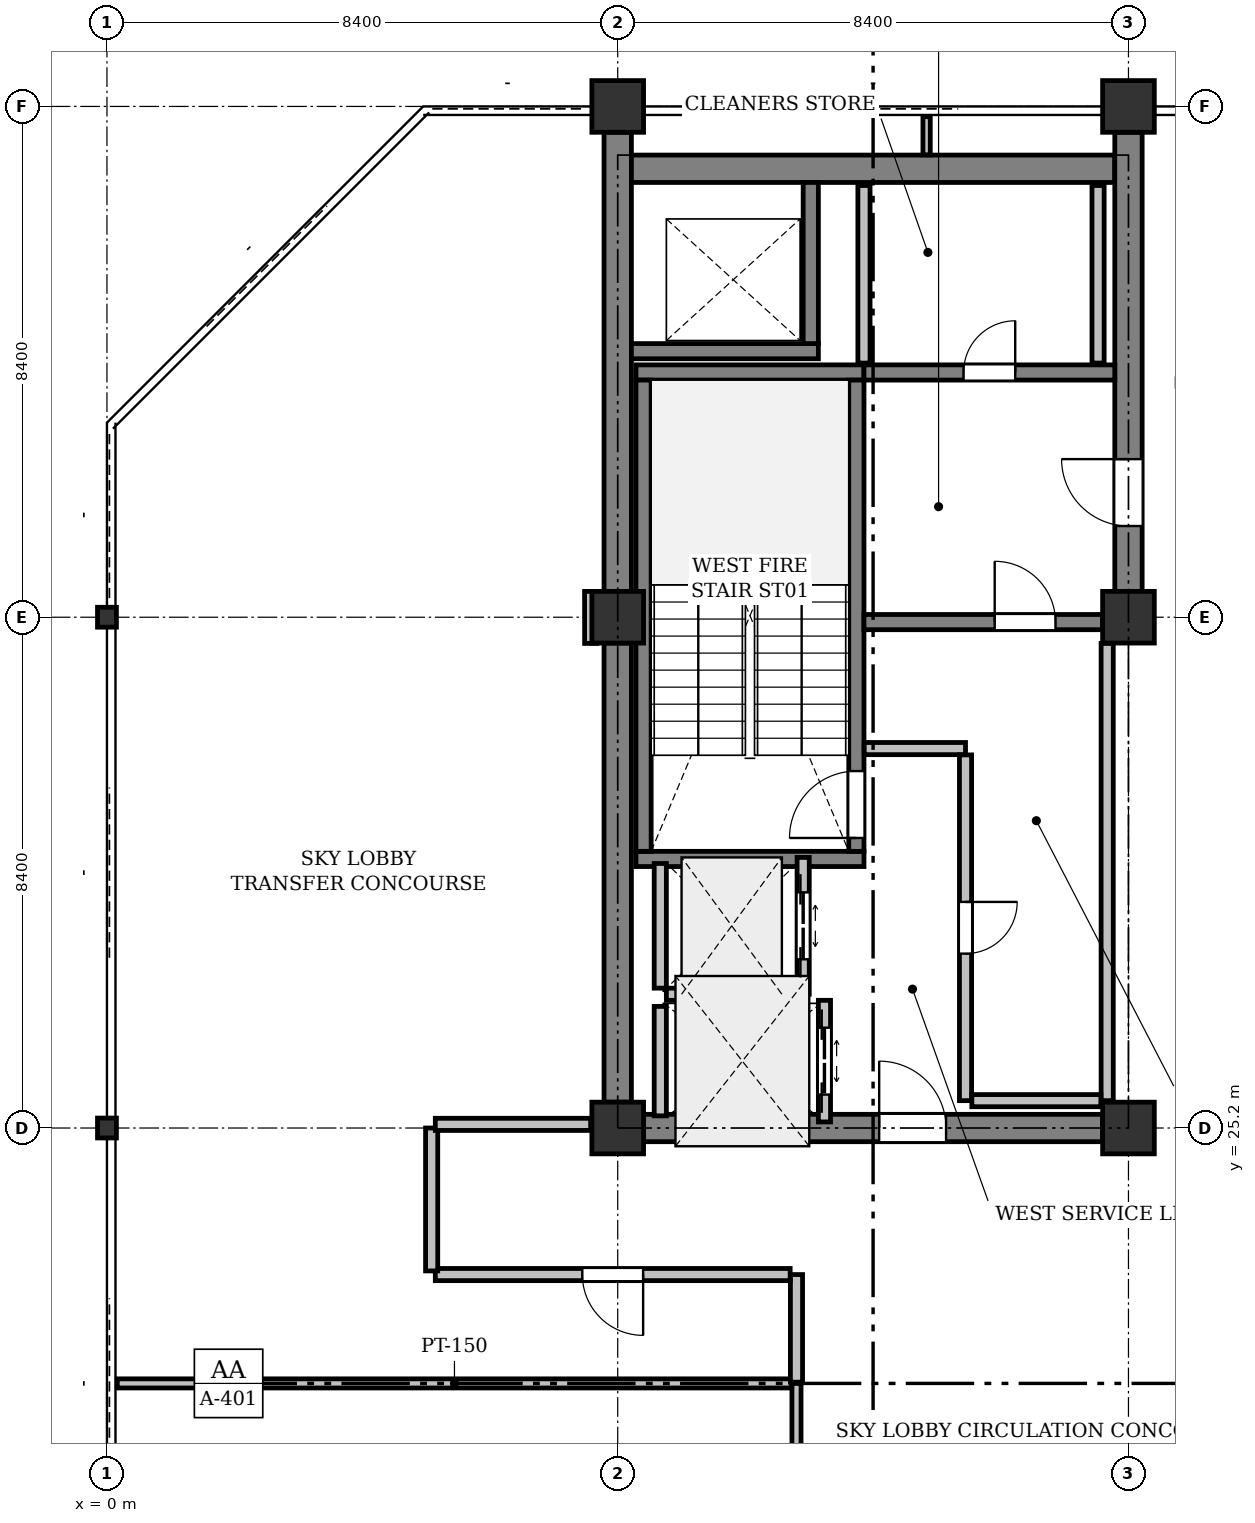
"""IFC4 building model, lengths in metres.
Left out: names, types, materials, properties, quantities, classifications, styles, units other than length and angle.
Written with IfcOpenShell. Run it as: python <this file> out.ifc"""

import sys

from ifc_helpers import new_model, si_unit, direction, frame, frame_2d, origin, origin_2d, place, context, subcontext, project, spatial, rectangle, i_section, extrude, element, fill, save


model = new_model("IFC4")
c1 = context("Model", 3, precision=1e-05, world=origin(), true_north=direction((0.0, 1.0)))
c2 = subcontext(c1, "Body", "Model", "MODEL_VIEW")
j1 = project(units=[si_unit("LENGTHUNIT", "METRE"), si_unit("PLANEANGLEUNIT", "RADIAN")], contexts=[c1])
p1 = place(None, origin())
s1 = spatial("IfcSite", under=j1, at=p1, CompositionType="ELEMENT")
p2 = place(p1, origin())
s2 = spatial("IfcBuilding", under=s1, at=p2, CompositionType="ELEMENT")
p3 = place(p2, frame((0.0, 0.0, 286.2)))
s3 = spatial("IfcBuildingStorey", under=s2, at=p3, CompositionType="ELEMENT", Elevation=286.2)
for number, where, z_axis, x_axis in (
    (1, (0.0, 25.2, 0.0), (0.0, 0.0, 1.0), (1.0, 0.0, 0.0)),
    (2, (0.0, 33.6, 0.0), (0.0, 0.0, 1.0), (1.0, 0.0, 0.0)),
):
    element("IfcColumn", number, at=place(p3, frame(where, z_axis=z_axis, x_axis=x_axis)), inside=s3, PredefinedType="COLUMN", context=c2, shape_type="SweptSolid", body=[
        extrude(i_section(OverallWidth=0.311, OverallDepth=0.327, WebThickness=0.016, FlangeThickness=0.025, FilletRadius=0.017, at=origin_2d()), origin(), (0.0, 0.0, 1.0), 4.0),
    ])
for number, where, z_axis, x_axis in (
    (3, (8.4, 25.2, 0.0), (0.0, 0.0, 1.0), (1.0, 0.0, 0.0)),
    (4, (8.4, 33.6, 0.0), (0.0, 0.0, 1.0), (1.0, 0.0, 0.0)),
    (5, (8.4, 42.0, 0.0), (0.0, 0.0, 1.0), (1.0, 0.0, 0.0)),
    (6, (16.8, 25.2, 0.0), (0.0, 0.0, 1.0), (1.0, 0.0, 0.0)),
    (7, (16.8, 33.6, 0.0), (0.0, 0.0, 1.0), (1.0, 0.0, 0.0)),
    (8, (16.8, 42.0, 0.0), (0.0, 0.0, 1.0), (1.0, 0.0, 0.0)),
):
    element("IfcColumn", number, at=place(p3, frame(where, z_axis=z_axis, x_axis=x_axis)), inside=s3, PredefinedType="COLUMN", context=c2, shape_type="SweptSolid", body=[
        extrude(rectangle(XDim=0.85, YDim=0.85, at=origin_2d()), origin(), (0.0, 0.0, 1.0), 4.0),
    ])
for number, where, z_axis, x_axis in (
    (9, (8.4, 25.625, 0.0), (0.0, 0.0, 1.0), (0.0, 1.0, 0.0)),
    (10, (8.4, 34.025, 0.0), (0.0, 0.0, 1.0), (0.0, 1.0, 0.0)),
):
    element("IfcWall", number, at=place(p3, frame(where, z_axis=z_axis, x_axis=x_axis)), inside=s3, PredefinedType="SHEAR", context=c2, shape_type="SweptSolid", body=[
        extrude(rectangle(XDim=7.55, YDim=0.45, at=frame_2d((3.775, 0.0))), origin(), (0.0, 0.0, 1.0), 3.725),
    ])
p4 = place(p3, frame((8.625, 40.975, 0.0), z_axis=(0.0, 0.0, 1.0), x_axis=(1.0, 0.0, 0.0)))
e11 = element("IfcWall", 11, at=p4, inside=s3, PredefinedType="SHEAR", context=c2, shape_type="SweptSolid", body=[
    extrude(rectangle(XDim=7.95, YDim=0.45, at=frame_2d((3.975, 0.0))), origin(), (0.0, 0.0, 1.0), 3.725),
])
p5 = place(p3, frame((16.8, 34.025, 0.0), z_axis=(0.0, 0.0, 1.0), x_axis=(0.0, 1.0, 0.0)))
e12 = element("IfcWall", 12, at=p5, inside=s3, PredefinedType="SHEAR", context=c2, shape_type="SweptSolid", body=[
    extrude(rectangle(XDim=7.55, YDim=0.45, at=frame_2d((3.775, 0.0))), origin(), (0.0, 0.0, 1.0), 3.725),
])
p6 = place(p5, frame((1.075, 0.0, 0.0)))
e13 = element("IfcOpeningElement", 13, at=p6, cuts=e12, PredefinedType="OPENING", context=c2, shape_type="SweptSolid", body=[
    extrude(rectangle(XDim=1.1, YDim=2.15, at=frame_2d((0.55, 1.075))), frame((0.0, 0.235, 0.0), z_axis=(0.0, -1.0, 0.0), x_axis=(1.0, 0.0, 0.0)), (0.0, 0.0, 1.0), 0.47),
])
p7 = place(p3, frame((8.825, 25.2, 0.0), z_axis=(0.0, 0.0, 1.0), x_axis=(1.0, 0.0, 0.0)))
e14 = element("IfcWall", 14, at=p7, inside=s3, PredefinedType="SHEAR", context=c2, shape_type="SweptSolid", body=[
    extrude(rectangle(XDim=7.55, YDim=0.45, at=frame_2d((3.775, 0.0))), origin(), (0.0, 0.0, 1.0), 3.725),
])
p8 = place(p7, frame((3.875, 0.0, 0.0)))
e15 = element("IfcOpeningElement", 15, at=p8, cuts=e14, PredefinedType="OPENING", context=c2, shape_type="SweptSolid", body=[
    extrude(rectangle(XDim=1.1, YDim=2.15, at=frame_2d((0.55, 1.075))), frame((0.0, 0.235, 0.0), z_axis=(0.0, -1.0, 0.0), x_axis=(1.0, 0.0, 0.0)), (0.0, 0.0, 1.0), 0.47),
])
for number, where, z_axis, x_axis in (
    (16, (12.45, 29.625, 0.0), (0.0, 0.0, 1.0), (-1.0, 0.0, 0.0)),
    (17, (12.45, 37.625, 0.0), (0.0, 0.0, 1.0), (-1.0, 0.0, 0.0)),
):
    element("IfcWall", number, at=place(p3, frame(where, z_axis=z_axis, x_axis=x_axis)), inside=s3, PredefinedType="SHEAR", context=c2, shape_type="SweptSolid", body=[
        extrude(rectangle(XDim=3.75, YDim=0.25, at=frame_2d((1.875, 0.0))), origin(), (0.0, 0.0, 1.0), 3.725),
    ])
p9 = place(p3, frame((12.325, 29.75, 0.0), z_axis=(0.0, 0.0, 1.0), x_axis=(0.0, 1.0, 0.0)))
e18 = element("IfcWall", 18, at=p9, inside=s3, PredefinedType="SHEAR", context=c2, shape_type="SweptSolid", body=[
    extrude(rectangle(XDim=7.75, YDim=0.25, at=frame_2d((3.875, 0.0))), origin(), (0.0, 0.0, 1.0), 3.725),
])
p10 = place(p9, frame((0.22, 0.0, 0.0)))
e19 = element("IfcOpeningElement", 19, at=p10, cuts=e18, PredefinedType="OPENING", context=c2, shape_type="SweptSolid", body=[
    extrude(rectangle(XDim=1.1, YDim=2.15, at=frame_2d((0.55, 1.075))), frame((0.0, 0.135, 0.0), z_axis=(0.0, -1.0, 0.0), x_axis=(1.0, 0.0, 0.0)), (0.0, 0.0, 1.0), 0.27),
])
p11 = place(p3, frame((8.825, 29.75, 0.0), z_axis=(0.0, 0.0, 1.0), x_axis=(0.0, 1.0, 0.0)))
e20 = element("IfcWall", 20, at=p11, inside=s3, PredefinedType="SHEAR", context=c2, shape_type="SweptSolid", body=[
    extrude(rectangle(XDim=7.75, YDim=0.25, at=frame_2d((3.875, 0.0))), origin(), (0.0, 0.0, 1.0), 3.725),
])
p12 = place(p3, frame((8.625, 37.975, 0.0), z_axis=(0.0, 0.0, 1.0), x_axis=(1.0, 0.0, 0.0)))
e21 = element("IfcWall", 21, at=p12, inside=s3, PredefinedType="SHEAR", context=c2, shape_type="SweptSolid", body=[
    extrude(rectangle(XDim=3.075, YDim=0.25, at=frame_2d((1.538, 0.0))), origin(), (0.0, 0.0, 1.0), 3.725),
])
p13 = place(p3, frame((11.575, 38.1, 0.0), z_axis=(0.0, 0.0, 1.0), x_axis=(0.0, 1.0, 0.0)))
e22 = element("IfcWall", 22, at=p13, inside=s3, PredefinedType="SHEAR", context=c2, shape_type="SweptSolid", body=[
    extrude(rectangle(XDim=2.65, YDim=0.25, at=frame_2d((1.325, 0.0))), origin(), (0.0, 0.0, 1.0), 3.725),
])
p14 = place(p3, frame((12.45, 33.52, 0.0), z_axis=(0.0, 0.0, 1.0), x_axis=(1.0, 0.0, 0.0)))
e23 = element("IfcWall", 23, at=p14, inside=s3, PredefinedType="SHEAR", context=c2, shape_type="SweptSolid", body=[
    extrude(rectangle(XDim=3.925, YDim=0.25, at=frame_2d((1.962, 0.0))), origin(), (0.0, 0.0, 1.0), 3.725),
])
p15 = place(p14, frame((2.15, 0.0, 0.0)))
e24 = element("IfcOpeningElement", 24, at=p15, cuts=e23, PredefinedType="OPENING", context=c2, shape_type="SweptSolid", body=[
    extrude(rectangle(XDim=1.0, YDim=2.15, at=frame_2d((0.5, 1.075))), frame((0.0, 0.135, 0.0), z_axis=(0.0, -1.0, 0.0), x_axis=(1.0, 0.0, 0.0)), (0.0, 0.0, 1.0), 0.27),
])
p16 = place(p3, frame((12.45, 37.625, 0.0), z_axis=(0.0, 0.0, 1.0), x_axis=(1.0, 0.0, 0.0)))
e25 = element("IfcWall", 25, at=p16, inside=s3, PredefinedType="SHEAR", context=c2, shape_type="SweptSolid", body=[
    extrude(rectangle(XDim=4.125, YDim=0.25, at=frame_2d((2.062, 0.0))), origin(), (0.0, 0.0, 1.0), 3.725),
])
p17 = place(p16, frame((1.637, 0.0, 0.0)))
e26 = element("IfcOpeningElement", 26, at=p17, cuts=e25, PredefinedType="OPENING", context=c2, shape_type="SweptSolid", body=[
    extrude(rectangle(XDim=0.85, YDim=2.15, at=frame_2d((0.425, 1.075))), frame((0.0, 0.135, 0.0), z_axis=(0.0, -1.0, 0.0), x_axis=(1.0, 0.0, 0.0)), (0.0, 0.0, 1.0), 0.27),
])
p18 = place(p3, frame((11.45, 27.4, 0.0), z_axis=(0.0, 0.0, 1.0), x_axis=(0.0, 1.0, 0.0)))
e27 = element("IfcWall", 27, at=p18, inside=s3, PredefinedType="PARTITIONING", context=c2, shape_type="SweptSolid", body=[
    extrude(rectangle(XDim=2.25, YDim=0.2, at=frame_2d((1.125, 0.0))), origin(), (0.0, 0.0, 1.0), 3.725),
])
p19 = place(p18, frame((0.575, 0.0, 0.0)))
e28 = element("IfcOpeningElement", 28, at=p19, cuts=e27, PredefinedType="OPENING", context=c2, shape_type="SweptSolid", body=[
    extrude(rectangle(XDim=1.1, YDim=2.2, at=frame_2d((0.55, 1.1))), frame((0.0, 0.11, 0.0), z_axis=(0.0, -1.0, 0.0), x_axis=(1.0, 0.0, 0.0)), (0.0, 0.0, 1.0), 0.22),
])
p20 = place(p3, frame((9.1, 27.5, 0.0), z_axis=(0.0, 0.0, 1.0), x_axis=(0.0, 1.0, 0.0)))
e29 = element("IfcWall", 29, at=p20, inside=s3, PredefinedType="PARTITIONING", context=c2, shape_type="SweptSolid", body=[
    extrude(rectangle(XDim=2.05, YDim=0.2, at=frame_2d((1.025, 0.0))), origin(), (0.0, 0.0, 1.0), 3.725),
])
p21 = place(p3, frame((9.2, 27.4, 0.0), z_axis=(0.0, 0.0, 1.0), x_axis=(1.0, 0.0, 0.0)))
e30 = element("IfcWall", 30, at=p21, inside=s3, PredefinedType="PARTITIONING", context=c2, shape_type="SweptSolid", body=[
    extrude(rectangle(XDim=2.15, YDim=0.2, at=frame_2d((1.075, 0.0))), origin(), (0.0, 0.0, 1.0), 3.725),
])
p22 = place(p3, frame((11.8, 25.3, 0.0), z_axis=(0.0, 0.0, 1.0), x_axis=(0.0, 1.0, 0.0)))
e31 = element("IfcWall", 31, at=p22, inside=s3, PredefinedType="PARTITIONING", context=c2, shape_type="SweptSolid", body=[
    extrude(rectangle(XDim=2.0, YDim=0.2, at=frame_2d((1.0, 0.0))), origin(), (0.0, 0.0, 1.0), 3.725),
])
p23 = place(p22, frame((0.45, 0.0, 0.0)))
e32 = element("IfcOpeningElement", 32, at=p23, cuts=e31, PredefinedType="OPENING", context=c2, shape_type="SweptSolid", body=[
    extrude(rectangle(XDim=1.1, YDim=2.2, at=frame_2d((0.55, 1.1))), frame((0.0, 0.11, 0.0), z_axis=(0.0, -1.0, 0.0), x_axis=(1.0, 0.0, 0.0)), (0.0, 0.0, 1.0), 0.22),
])
p24 = place(p3, frame((9.1, 25.4, 0.0), z_axis=(0.0, 0.0, 1.0), x_axis=(0.0, 1.0, 0.0)))
e33 = element("IfcWall", 33, at=p24, inside=s3, PredefinedType="PARTITIONING", context=c2, shape_type="SweptSolid", body=[
    extrude(rectangle(XDim=1.8, YDim=0.2, at=frame_2d((0.9, 0.0))), origin(), (0.0, 0.0, 1.0), 3.725),
])
p25 = place(p3, frame((16.45, 25.65, 0.0), z_axis=(0.0, 0.0, 1.0), x_axis=(0.0, 1.0, 0.0)))
e34 = element("IfcWall", 34, at=p25, inside=s3, PredefinedType="PARTITIONING", context=c2, shape_type="SweptSolid", body=[
    extrude(rectangle(XDim=7.52, YDim=0.2, at=frame_2d((3.76, 0.0))), origin(), (0.0, 0.0, 1.0), 3.725),
])
p26 = place(p3, frame((12.454, 31.44, 0.0), z_axis=(0.0, 0.0, 1.0), x_axis=(1.0, 0.0, 0.0)))
e35 = element("IfcWall", 35, at=p26, inside=s3, PredefinedType="PARTITIONING", context=c2, shape_type="SweptSolid", body=[
    extrude(rectangle(XDim=1.666, YDim=0.2, at=frame_2d((0.833, 0.0))), origin(), (0.0, 0.0, 1.0), 3.725),
])
p27 = place(p3, frame((14.12, 31.336, 0.0), z_axis=(0.0, 0.0, 1.0), x_axis=(0.0, -1.0, 0.0)))
e36 = element("IfcWall", 36, at=p27, inside=s3, PredefinedType="PARTITIONING", context=c2, shape_type="SweptSolid", body=[
    extrude(rectangle(XDim=5.686, YDim=0.2, at=frame_2d((2.843, 0.0))), origin(), (0.0, 0.0, 1.0), 3.725),
])
p28 = place(p27, frame((2.418, 0.0, 0.0)))
e37 = element("IfcOpeningElement", 37, at=p28, cuts=e36, PredefinedType="OPENING", context=c2, shape_type="SweptSolid", body=[
    extrude(rectangle(XDim=0.85, YDim=2.15, at=frame_2d((0.425, 1.075))), frame((0.0, 0.11, 0.0), z_axis=(0.0, -1.0, 0.0), x_axis=(1.0, 0.0, 0.0)), (0.0, 0.0, 1.0), 0.22),
])
p29 = place(p3, frame((14.224, 25.65, 0.0), z_axis=(0.0, 0.0, 1.0), x_axis=(1.0, 0.0, 0.0)))
e38 = element("IfcWall", 38, at=p29, inside=s3, PredefinedType="PARTITIONING", context=c2, shape_type="SweptSolid", body=[
    extrude(rectangle(XDim=2.122, YDim=0.2, at=frame_2d((1.061, 0.0))), origin(), (0.0, 0.0, 1.0), 3.725),
])
for number, where, z_axis, x_axis in (
    (39, (16.3, 37.78, 0.0), (0.0, 0.0, 1.0), (0.0, 1.0, 0.0)),
    (40, (12.45, 40.7, 0.0), (0.0, 0.0, 1.0), (0.0, -1.0, 0.0)),
):
    element("IfcWall", number, at=place(p3, frame(where, z_axis=z_axis, x_axis=x_axis)), inside=s3, PredefinedType="PARTITIONING", context=c2, shape_type="SweptSolid", body=[
        extrude(rectangle(XDim=2.92, YDim=0.2, at=frame_2d((1.46, 0.0))), origin(), (0.0, 0.0, 1.0), 2.775),
    ])
p30 = place(p3, frame((11.34, 14.208, 0.0), z_axis=(0.0, 0.0, 1.0), x_axis=(0.0, 1.0, 0.0)))
e41 = element("IfcWall", 41, at=p30, inside=s3, PredefinedType="PARTITIONING", context=c2, shape_type="SweptSolid", body=[
    extrude(rectangle(XDim=6.792, YDim=0.15, at=frame_2d((3.396, 0.0))), origin(), (0.0, 0.0, 1.0), 3.271),
])
p31 = place(p30, frame((2.921, 0.0, 0.0)))
e42 = element("IfcOpeningElement", 42, at=p31, cuts=e41, PredefinedType="OPENING", context=c2, shape_type="SweptSolid", body=[
    extrude(rectangle(XDim=0.95, YDim=2.15, at=frame_2d((0.475, 1.075))), frame((0.0, 0.085, 0.0), z_axis=(0.0, -1.0, 0.0), x_axis=(1.0, 0.0, 0.0)), (0.0, 0.0, 1.0), 0.17),
])
p32 = place(p3, frame((11.261, 21.0, 0.0), z_axis=(0.0, 0.0, 1.0), x_axis=(-1.0, 0.0, 0.0)))
e43 = element("IfcWall", 43, at=p32, inside=s3, PredefinedType="PARTITIONING", context=c2, shape_type="SweptSolid", body=[
    extrude(rectangle(XDim=11.092, YDim=0.15, at=frame_2d((5.546, 0.0))), origin(), (0.0, 0.0, 1.0), 3.319),
])
p33 = place(p3, frame((13.48, 41.831, 0.0), z_axis=(0.0, 0.0, 1.0), x_axis=(0.0, -1.0, 0.0)))
e44 = element("IfcWall", 44, at=p33, inside=s3, PredefinedType="PARTITIONING", context=c2, shape_type="SweptSolid", body=[
    extrude(rectangle(XDim=0.627, YDim=0.12, at=frame_2d((0.313, 0.0))), origin(), (0.0, 0.0, 1.0), 3.725),
])
p34 = place(p3, frame((7.956, 33.169, 0.0), z_axis=(0.0, 0.0, 1.0), x_axis=(-0.000855919801, 0.999999633701, 0.0)))
e45 = element("IfcWall", 45, at=p34, inside=s3, PredefinedType="PARTITIONING", context=c2, shape_type="SweptSolid", body=[
    extrude(rectangle(XDim=0.856, YDim=0.2, at=frame_2d((0.428, 0.0))), origin(), (0.0, 0.0, 1.0), 3.271),
])
p35 = place(p3, frame((11.34, 21.02, 0.0), z_axis=(0.0, 0.0, 1.0), x_axis=(0.0, 1.0, 0.0)))
e46 = element("IfcWall", 46, at=p35, inside=s3, PredefinedType="PARTITIONING", context=c2, shape_type="SweptSolid", body=[
    extrude(rectangle(XDim=1.77, YDim=0.2, at=frame_2d((0.885, 0.0))), origin(), (0.0, 0.0, 1.0), 3.725),
])
p36 = place(p3, frame((11.236, 22.79, 0.0), z_axis=(0.0, 0.0, 1.0), x_axis=(-1.0, 0.0, 0.0)))
e47 = element("IfcWall", 47, at=p36, inside=s3, PredefinedType="PARTITIONING", context=c2, shape_type="SweptSolid", body=[
    extrude(rectangle(XDim=5.836, YDim=0.2, at=frame_2d((2.918, 0.0))), origin(), (0.0, 0.0, 1.0), 3.319),
])
p37 = place(p36, frame((2.418, 0.0, 0.0)))
e48 = element("IfcOpeningElement", 48, at=p37, cuts=e47, PredefinedType="OPENING", context=c2, shape_type="SweptSolid", body=[
    extrude(rectangle(XDim=1.0, YDim=2.15, at=frame_2d((0.5, 1.075))), frame((0.0, 0.11, 0.0), z_axis=(0.0, -1.0, 0.0), x_axis=(1.0, 0.0, 0.0)), (0.0, 0.0, 1.0), 0.22),
])
p38 = place(p3, frame((5.34, 22.85, 0.0), z_axis=(0.0, 0.0, 1.0), x_axis=(0.0, 1.0, 0.0)))
e49 = element("IfcWall", 49, at=p38, inside=s3, PredefinedType="PARTITIONING", context=c2, shape_type="SweptSolid", body=[
    extrude(rectangle(XDim=2.35, YDim=0.2, at=frame_2d((1.175, 0.0))), origin(), (0.0, 0.0, 1.0), 3.271),
])
p39 = place(p3, frame((5.4, 25.26, 0.0), z_axis=(0.0, 0.0, 1.0), x_axis=(1.0, 0.0, 0.0)))
e50 = element("IfcWall", 50, at=p39, inside=s3, PredefinedType="PARTITIONING", context=c2, shape_type="SweptSolid", body=[
    extrude(rectangle(XDim=2.555, YDim=0.2, at=frame_2d((1.278, 0.0))), origin(), (0.0, 0.0, 1.0), 3.271),
])
p40 = place(p6, origin())
e51 = element("IfcDoor", 51, at=p40, inside=s3, OperationType="SINGLE_SWING_RIGHT", PredefinedType="DOOR", context=c2, shape_type="SweptSolid", body=[
    extrude(rectangle(XDim=1.1, YDim=2.15, at=frame_2d((0.55, 1.075))), frame((0.0, 0.025, 0.0), z_axis=(0.0, -1.0, 0.0), x_axis=(1.0, 0.0, 0.0)), (0.0, 0.0, 1.0), 0.05),
])
fill(e13, e51)
p41 = place(p8, origin())
e52 = element("IfcDoor", 52, at=p41, inside=s3, OperationType="SINGLE_SWING_LEFT", PredefinedType="DOOR", context=c2, shape_type="SweptSolid", body=[
    extrude(rectangle(XDim=1.1, YDim=2.15, at=frame_2d((0.55, 1.075))), frame((0.0, 0.025, 0.0), z_axis=(0.0, -1.0, 0.0), x_axis=(1.0, 0.0, 0.0)), (0.0, 0.0, 1.0), 0.05),
])
fill(e15, e52)
p42 = place(p10, origin())
e53 = element("IfcDoor", 53, at=p42, inside=s3, OperationType="SINGLE_SWING_LEFT", PredefinedType="DOOR", context=c2, shape_type="SweptSolid", body=[
    extrude(rectangle(XDim=1.1, YDim=2.15, at=frame_2d((0.55, 1.075))), frame((0.0, 0.025, 0.0), z_axis=(0.0, -1.0, 0.0), x_axis=(1.0, 0.0, 0.0)), (0.0, 0.0, 1.0), 0.05),
])
fill(e19, e53)
p43 = place(p15, origin())
e54 = element("IfcDoor", 54, at=p43, inside=s3, OperationType="SINGLE_SWING_LEFT", PredefinedType="DOOR", context=c2, shape_type="SweptSolid", body=[
    extrude(rectangle(XDim=1.0, YDim=2.15, at=frame_2d((0.5, 1.075))), frame((0.0, 0.025, 0.0), z_axis=(0.0, -1.0, 0.0), x_axis=(1.0, 0.0, 0.0)), (0.0, 0.0, 1.0), 0.05),
])
fill(e24, e54)
p44 = place(p19, origin())
e55 = element("IfcDoor", 55, at=p44, inside=s3, OperationType="DOUBLE_DOOR_SLIDING", PredefinedType="DOOR", context=c2, shape_type="SweptSolid", body=[
    extrude(rectangle(XDim=1.1, YDim=2.2, at=frame_2d((0.55, 1.1))), frame((0.0, 0.025, 0.0), z_axis=(0.0, -1.0, 0.0), x_axis=(1.0, 0.0, 0.0)), (0.0, 0.0, 1.0), 0.05),
])
fill(e28, e55)
p45 = place(p23, origin())
e56 = element("IfcDoor", 56, at=p45, inside=s3, OperationType="DOUBLE_DOOR_SLIDING", PredefinedType="DOOR", context=c2, shape_type="SweptSolid", body=[
    extrude(rectangle(XDim=1.1, YDim=2.2, at=frame_2d((0.55, 1.1))), frame((0.0, 0.025, 0.0), z_axis=(0.0, -1.0, 0.0), x_axis=(1.0, 0.0, 0.0)), (0.0, 0.0, 1.0), 0.05),
])
fill(e32, e56)
p46 = place(p28, origin())
e57 = element("IfcDoor", 57, at=p46, inside=s3, OperationType="SINGLE_SWING_LEFT", PredefinedType="DOOR", context=c2, shape_type="SweptSolid", body=[
    extrude(rectangle(XDim=0.85, YDim=2.15, at=frame_2d((0.425, 1.075))), frame((0.0, 0.025, 0.0), z_axis=(0.0, -1.0, 0.0), x_axis=(1.0, 0.0, 0.0)), (0.0, 0.0, 1.0), 0.05),
])
fill(e37, e57)
p47 = place(p17, origin())
e58 = element("IfcDoor", 58, at=p47, inside=s3, OperationType="SINGLE_SWING_RIGHT", PredefinedType="DOOR", context=c2, shape_type="SweptSolid", body=[
    extrude(rectangle(XDim=0.85, YDim=2.15, at=frame_2d((0.425, 1.075))), frame((0.0, 0.025, 0.0), z_axis=(0.0, -1.0, 0.0), x_axis=(1.0, 0.0, 0.0)), (0.0, 0.0, 1.0), 0.05),
])
fill(e26, e58)
p48 = place(p37, origin())
e59 = element("IfcDoor", 59, at=p48, inside=s3, OperationType="SINGLE_SWING_LEFT", PredefinedType="DOOR", context=c2, shape_type="SweptSolid", body=[
    extrude(rectangle(XDim=1.0, YDim=2.15, at=frame_2d((0.5, 1.075))), frame((0.0, 0.025, 0.0), z_axis=(0.0, -1.0, 0.0), x_axis=(1.0, 0.0, 0.0)), (0.0, 0.0, 1.0), 0.05),
])
fill(e48, e59)
save(model, sys.argv[1])
